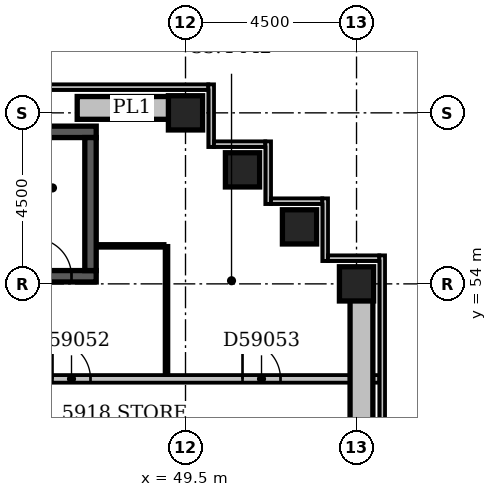
"""IFC4 building model, lengths in metres.
Left out: names, types, materials, properties, quantities, classifications, styles, units other than length and angle.
Written with IfcOpenShell. Run it as: python <this file> out.ifc"""

import sys

from ifc_helpers import new_model, si_unit, direction, frame, frame_2d, origin, origin_2d, place, context, subcontext, project, spatial, rectangle, extrude, element, fill, save


model = new_model("IFC4")
c1 = context("Model", 3, precision=1e-05, world=origin(), true_north=direction((0.0, 1.0)))
c2 = subcontext(c1, "Body", "Model", "MODEL_VIEW")
j1 = project(units=[si_unit("LENGTHUNIT", "METRE"), si_unit("PLANEANGLEUNIT", "RADIAN")], contexts=[c1])
p1 = place(None, origin())
s1 = spatial("IfcSite", under=j1, at=p1, CompositionType="ELEMENT")
p2 = place(p1, origin())
s2 = spatial("IfcBuilding", under=s1, at=p2, CompositionType="ELEMENT")
p3 = place(p2, frame((0.0, 0.0, 229.4)))
s3 = spatial("IfcBuildingStorey", under=s2, at=p3, CompositionType="ELEMENT", Elevation=229.4)
p4 = place(p3, frame((44.85, 54.2, -0.3), z_axis=(0.0, 0.0, 1.0), x_axis=(1.0, 0.0, 0.0)))
e1 = element("IfcWall", 1, at=p4, inside=s3, PredefinedType="SHEAR", context=c2, shape_type="SweptSolid", body=[
    extrude(rectangle(XDim=2.3, YDim=0.3, at=frame_2d((1.15, 0.0))), origin(), (0.0, 0.0, 1.0), 3.55),
])
p5 = place(p4, frame((0.65, 0.0, 0.3)))
e2 = element("IfcOpeningElement", 2, at=p5, cuts=e1, PredefinedType="OPENING", context=c2, shape_type="SweptSolid", body=[
    extrude(rectangle(XDim=1.0, YDim=2.1, at=frame_2d((0.5, 1.05))), frame((0.0, 0.162, 0.0), z_axis=(0.0, -1.0, 0.0), x_axis=(1.0, 0.0, 0.0)), (0.0, 0.0, 1.0), 0.324),
])
p6 = place(p3, frame((44.85, 58.0, -0.3), z_axis=(0.0, 0.0, 1.0), x_axis=(1.0, 0.0, 0.0)))
e3 = element("IfcWall", 3, at=p6, inside=s3, PredefinedType="SHEAR", context=c2, shape_type="SweptSolid", body=[
    extrude(rectangle(XDim=2.3, YDim=0.3, at=frame_2d((1.15, 0.0))), origin(), (0.0, 0.0, 1.0), 3.55),
])
p7 = place(p3, frame((47.0, 54.35, -0.3), z_axis=(0.0, 0.0, 1.0), x_axis=(0.0, 1.0, 0.0)))
e4 = element("IfcWall", 4, at=p7, inside=s3, PredefinedType="SHEAR", context=c2, shape_type="SweptSolid", body=[
    extrude(rectangle(XDim=3.5, YDim=0.3, at=frame_2d((1.75, 0.0))), origin(), (0.0, 0.0, 1.0), 3.55),
])
for number, where, z_axis, x_axis in (
    (5, (54.0, 54.0, -0.3), (0.0, 0.0, 1.0), (1.0, 0.0, 0.0)),
    (6, (52.5, 55.5, -0.3), (0.0, 0.0, 1.0), (1.0, 0.0, 0.0)),
    (7, (51.0, 57.0, -0.3), (0.0, 0.0, 1.0), (1.0, 0.0, 0.0)),
    (8, (49.5, 58.5, -0.3), (0.0, 0.0, 1.0), (1.0, 0.0, 0.0)),
):
    element("IfcColumn", number, at=place(p3, frame(where, z_axis=z_axis, x_axis=x_axis)), inside=s3, PredefinedType="COLUMN", context=c2, shape_type="SweptSolid", body=[
        extrude(rectangle(XDim=0.9, YDim=0.9, at=origin_2d()), origin(), (0.0, 0.0, 1.0), 3.55),
    ])
p8 = place(p3, frame((54.675, 39.9, 0.0), z_axis=(0.0, 0.0, 1.0), x_axis=(0.0, 1.0, 0.0)))
e9 = element("IfcWall", 9, at=p8, inside=s3, PredefinedType="STANDARD", context=c2, shape_type="SweptSolid", body=[
    extrude(rectangle(XDim=14.85, YDim=0.15, at=frame_2d((7.425, 0.0))), origin(), (0.0, 0.0, 1.0), 2.7),
])
p9 = place(p8, frame((6.15, 0.0, 0.6)))
e10 = element("IfcOpeningElement", 10, at=p9, cuts=e9, PredefinedType="OPENING", context=c2, shape_type="SweptSolid", body=[
    extrude(rectangle(XDim=2.4, YDim=1.8, at=frame_2d((1.2, 0.9))), frame((0.0, 0.087, 0.0), z_axis=(0.0, -1.0, 0.0), x_axis=(1.0, 0.0, 0.0)), (0.0, 0.0, 1.0), 0.174),
])
p10 = place(p3, frame((54.6, 54.675, 0.0), z_axis=(0.0, 0.0, 1.0), x_axis=(-1.0, 0.0, 0.0)))
e11 = element("IfcWall", 11, at=p10, inside=s3, PredefinedType="STANDARD", context=c2, shape_type="SweptSolid", body=[
    extrude(rectangle(XDim=1.35, YDim=0.15, at=frame_2d((0.675, 0.0))), origin(), (0.0, 0.0, 1.0), 2.7),
])
p11 = place(p3, frame((53.175, 54.6, 0.0), z_axis=(0.0, 0.0, 1.0), x_axis=(0.0, 1.0, 0.0)))
e12 = element("IfcWall", 12, at=p11, inside=s3, PredefinedType="STANDARD", context=c2, shape_type="SweptSolid", body=[
    extrude(rectangle(XDim=1.65, YDim=0.15, at=frame_2d((0.825, 0.0))), origin(), (0.0, 0.0, 1.0), 2.7),
])
p12 = place(p3, frame((53.1, 56.175, 0.0), z_axis=(0.0, 0.0, 1.0), x_axis=(-1.0, 0.0, 0.0)))
e13 = element("IfcWall", 13, at=p12, inside=s3, PredefinedType="STANDARD", context=c2, shape_type="SweptSolid", body=[
    extrude(rectangle(XDim=1.35, YDim=0.15, at=frame_2d((0.675, 0.0))), origin(), (0.0, 0.0, 1.0), 2.7),
])
p13 = place(p3, frame((51.675, 56.1, 0.0), z_axis=(0.0, 0.0, 1.0), x_axis=(0.0, 1.0, 0.0)))
e14 = element("IfcWall", 14, at=p13, inside=s3, PredefinedType="STANDARD", context=c2, shape_type="SweptSolid", body=[
    extrude(rectangle(XDim=1.65, YDim=0.15, at=frame_2d((0.825, 0.0))), origin(), (0.0, 0.0, 1.0), 2.7),
])
p14 = place(p3, frame((51.6, 57.675, 0.0), z_axis=(0.0, 0.0, 1.0), x_axis=(-1.0, 0.0, 0.0)))
e15 = element("IfcWall", 15, at=p14, inside=s3, PredefinedType="STANDARD", context=c2, shape_type="SweptSolid", body=[
    extrude(rectangle(XDim=1.35, YDim=0.15, at=frame_2d((0.675, 0.0))), origin(), (0.0, 0.0, 1.0), 2.7),
])
p15 = place(p3, frame((50.175, 57.6, 0.0), z_axis=(0.0, 0.0, 1.0), x_axis=(0.0, 1.0, 0.0)))
e16 = element("IfcWall", 16, at=p15, inside=s3, PredefinedType="STANDARD", context=c2, shape_type="SweptSolid", body=[
    extrude(rectangle(XDim=1.65, YDim=0.15, at=frame_2d((0.825, 0.0))), origin(), (0.0, 0.0, 1.0), 2.7),
])
p16 = place(p3, frame((50.1, 59.175, 0.0), z_axis=(0.0, 0.0, 1.0), x_axis=(-1.0, 0.0, 0.0)))
e17 = element("IfcWall", 17, at=p16, inside=s3, PredefinedType="STANDARD", context=c2, shape_type="SweptSolid", body=[
    extrude(rectangle(XDim=50.85, YDim=0.15, at=frame_2d((25.425, 0.0))), origin(), (0.0, 0.0, 1.0), 2.7),
])
p17 = place(p3, frame((46.65, 58.63, 3.6), z_axis=(0.0, 0.0, 1.0), x_axis=(1.0, 0.0, 0.0)))
e18 = element("IfcWall", 18, at=p17, inside=s3, PredefinedType="STANDARD", context=c2, shape_type="SweptSolid", body=[
    extrude(rectangle(XDim=2.88, YDim=0.6, at=frame_2d((1.44, 0.0))), origin(), (0.0, 0.0, 1.0), 0.6),
])
p18 = place(p3, frame((54.13, 54.03, 3.6), z_axis=(0.0, 0.0, 1.0), x_axis=(0.0, -1.0, 0.0)))
e19 = element("IfcWall", 19, at=p18, inside=s3, PredefinedType="STANDARD", context=c2, shape_type="SweptSolid", body=[
    extrude(rectangle(XDim=13.56, YDim=0.6, at=frame_2d((6.78, 0.0))), origin(), (0.0, 0.0, 1.0), 0.6),
])
p19 = place(p3, frame((44.1, 51.5, 0.0), z_axis=(0.0, 0.0, 1.0), x_axis=(1.0, 0.0, 0.0)))
e20 = element("IfcWall", 20, at=p19, inside=s3, PredefinedType="PARTITIONING", context=c2, shape_type="SweptSolid", body=[
    extrude(rectangle(XDim=10.5, YDim=0.2, at=frame_2d((5.25, 0.0))), origin(), (0.0, 0.0, 1.0), 3.25),
])
p20 = place(p19, frame((1.9, 0.0, 0.0)))
e21 = element("IfcOpeningElement", 21, at=p20, cuts=e20, PredefinedType="OPENING", context=c2, shape_type="SweptSolid", body=[
    extrude(rectangle(XDim=1.0, YDim=2.1, at=frame_2d((0.5, 1.05))), frame((0.0, 0.112, 0.0), z_axis=(0.0, -1.0, 0.0), x_axis=(1.0, 0.0, 0.0)), (0.0, 0.0, 1.0), 0.224),
])
p21 = place(p19, frame((6.9, 0.0, 0.0)))
e22 = element("IfcOpeningElement", 22, at=p21, cuts=e20, PredefinedType="OPENING", context=c2, shape_type="SweptSolid", body=[
    extrude(rectangle(XDim=1.0, YDim=2.1, at=frame_2d((0.5, 1.05))), frame((0.0, 0.112, 0.0), z_axis=(0.0, -1.0, 0.0), x_axis=(1.0, 0.0, 0.0)), (0.0, 0.0, 1.0), 0.224),
])
p22 = place(p3, frame((49.0, 51.6, 0.0), z_axis=(0.0, 0.0, 1.0), x_axis=(0.0, 1.0, 0.0)))
e23 = element("IfcWall", 23, at=p22, inside=s3, PredefinedType="PARTITIONING", context=c2, shape_type="SweptSolid", body=[
    extrude(rectangle(XDim=3.4, YDim=0.1, at=frame_2d((1.7, 0.0))), origin(), (0.0, 0.0, 1.0), 3.25),
])
p23 = place(p3, frame((47.15, 55.0, 0.0), z_axis=(0.0, 0.0, 1.0), x_axis=(1.0, 0.0, 0.0)))
e24 = element("IfcWall", 24, at=p23, inside=s3, PredefinedType="PARTITIONING", context=c2, shape_type="SweptSolid", body=[
    extrude(rectangle(XDim=1.8, YDim=0.1, at=frame_2d((0.9, 0.0))), origin(), (0.0, 0.0, 1.0), 3.25),
])
p24 = place(p5, origin())
e25 = element("IfcDoor", 25, at=p24, inside=s3, OperationType="SINGLE_SWING_LEFT", PredefinedType="DOOR", context=c2, shape_type="SweptSolid", body=[
    extrude(rectangle(XDim=1.0, YDim=2.1, at=frame_2d((0.5, 1.05))), frame((0.0, 0.025, 0.0), z_axis=(0.0, -1.0, 0.0), x_axis=(1.0, 0.0, 0.0)), (0.0, 0.0, 1.0), 0.05),
])
fill(e2, e25)
p25 = place(p20, origin())
e26 = element("IfcDoor", 26, at=p25, inside=s3, OperationType="SINGLE_SWING_LEFT", PredefinedType="DOOR", context=c2, shape_type="SweptSolid", body=[
    extrude(rectangle(XDim=1.0, YDim=2.1, at=frame_2d((0.5, 1.05))), frame((0.0, 0.025, 0.0), z_axis=(0.0, -1.0, 0.0), x_axis=(1.0, 0.0, 0.0)), (0.0, 0.0, 1.0), 0.05),
])
fill(e21, e26)
p26 = place(p21, origin())
e27 = element("IfcDoor", 27, at=p26, inside=s3, OperationType="SINGLE_SWING_LEFT", PredefinedType="DOOR", context=c2, shape_type="SweptSolid", body=[
    extrude(rectangle(XDim=1.0, YDim=2.1, at=frame_2d((0.5, 1.05))), frame((0.0, 0.025, 0.0), z_axis=(0.0, -1.0, 0.0), x_axis=(1.0, 0.0, 0.0)), (0.0, 0.0, 1.0), 0.05),
])
fill(e22, e27)
save(model, sys.argv[1])
